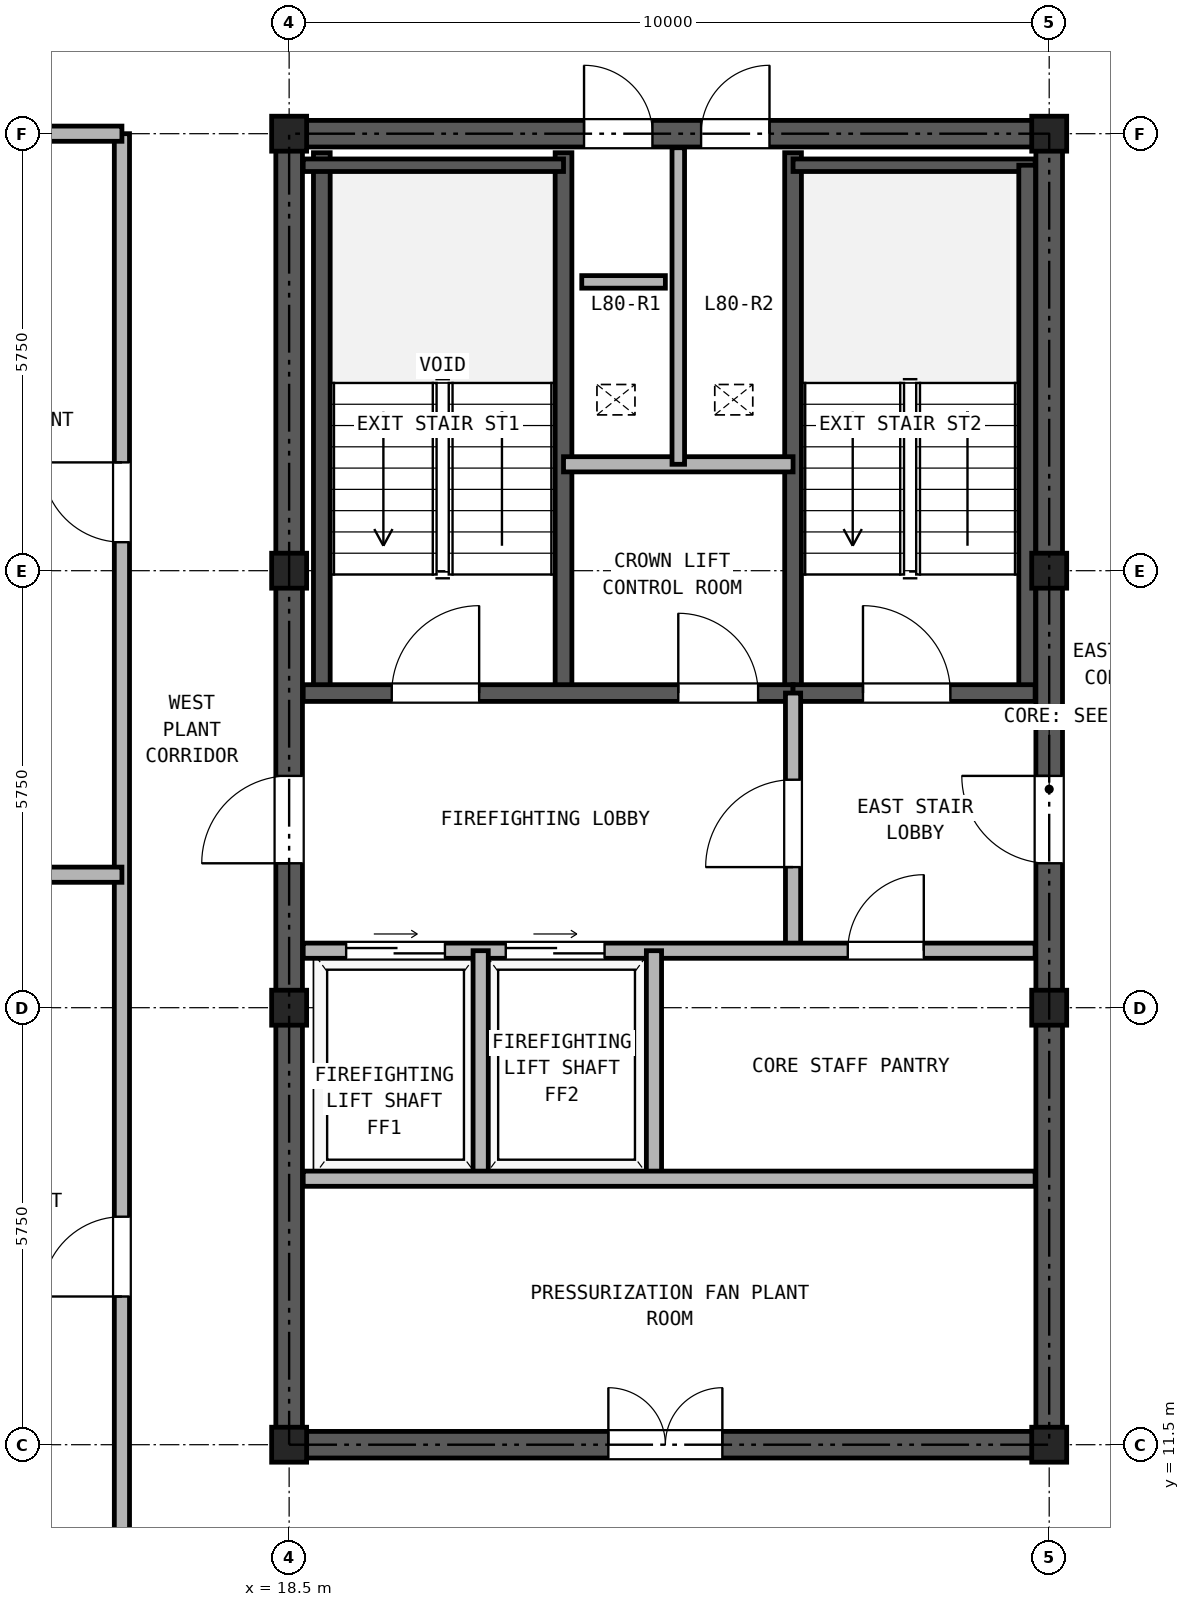
"""IFC4 building model, lengths in metres.
Left out: names, types, materials, properties, quantities, classifications, styles, units other than length and angle.
Written with IfcOpenShell. Run it as: python <this file> out.ifc"""

import sys

from ifc_helpers import new_model, si_unit, direction, frame, frame_2d, origin, origin_2d, place, context, subcontext, project, spatial, rectangle, hollow_rectangle, extrude, source, transform, mapped, element, fill, save


model = new_model("IFC4")
c1 = context("Model", 3, precision=1e-05, world=origin(), true_north=direction((0.0, 1.0)))
c2 = subcontext(c1, "Body", "Model", "MODEL_VIEW")
j1 = project(units=[si_unit("LENGTHUNIT", "METRE"), si_unit("PLANEANGLEUNIT", "RADIAN")], contexts=[c1])
p1 = place(None, origin())
s1 = spatial("IfcSite", under=j1, at=p1, CompositionType="ELEMENT")
p2 = place(p1, origin())
s2 = spatial("IfcBuilding", under=s1, at=p2, CompositionType="ELEMENT")
p3 = place(p2, frame((0.0, 0.0, 278.5)))
s3 = spatial("IfcBuildingStorey", under=s2, at=p3, CompositionType="ELEMENT", Elevation=278.5)
m1 = source(origin(), c2, "Body", "SweptSolid", [
    extrude(hollow_rectangle(XDim=0.46, YDim=0.46, WallThickness=0.025, at=origin_2d()), origin(), (0.0, 0.0, 1.0), 3.38),
])
for number, where, z_axis, x_axis in (
    (1, (18.5, 11.5, 0.0), (0.0, 0.0, 1.0), (1.0, 0.0, 0.0)),
    (2, (18.5, 17.25, 0.0), (0.0, 0.0, 1.0), (1.0, 0.0, 0.0)),
    (3, (18.5, 23.0, 0.0), (0.0, 0.0, 1.0), (1.0, 0.0, 0.0)),
    (4, (18.5, 28.75, 0.0), (0.0, 0.0, 1.0), (1.0, 0.0, 0.0)),
    (5, (28.5, 11.5, 0.0), (0.0, 0.0, 1.0), (1.0, 0.0, 0.0)),
    (6, (28.5, 17.25, 0.0), (0.0, 0.0, 1.0), (1.0, 0.0, 0.0)),
    (7, (28.5, 23.0, 0.0), (0.0, 0.0, 1.0), (1.0, 0.0, 0.0)),
    (8, (28.5, 28.75, 0.0), (0.0, 0.0, 1.0), (1.0, 0.0, 0.0)),
):
    element("IfcColumn", number, at=place(p3, frame(where, z_axis=z_axis, x_axis=x_axis)), inside=s3, PredefinedType="COLUMN", context=c2, shape_type="MappedRepresentation", body=[
        mapped(m1, transform((0.0, 0.0, 0.0), x_axis=(1.0, 0.0, 0.0), y_axis=(0.0, 1.0, 0.0), z_axis=(0.0, 0.0, 1.0), scale=1.0)),
    ])
p4 = place(p3, frame((18.325, 11.5, 0.0), z_axis=(0.0, 0.0, 1.0), x_axis=(1.0, 0.0, 0.0)))
e9 = element("IfcWall", 9, at=p4, inside=s3, PredefinedType="SHEAR", context=c2, shape_type="SweptSolid", body=[
    extrude(rectangle(XDim=10.35, YDim=0.35, at=frame_2d((5.175, 0.0))), origin(), (0.0, 0.0, 1.0), 3.38),
])
p5 = place(p4, frame((4.375, 0.0, 0.0)))
e10 = element("IfcOpeningElement", 10, at=p5, cuts=e9, PredefinedType="OPENING", context=c2, shape_type="SweptSolid", body=[
    extrude(rectangle(XDim=1.5, YDim=2.25, at=frame_2d((0.75, 1.125))), frame((0.0, 0.185, 0.0), z_axis=(0.0, -1.0, 0.0), x_axis=(1.0, 0.0, 0.0)), (0.0, 0.0, 1.0), 0.37),
])
p6 = place(p3, frame((18.325, 28.75, 0.0), z_axis=(0.0, 0.0, 1.0), x_axis=(1.0, 0.0, 0.0)))
e11 = element("IfcWall", 11, at=p6, inside=s3, PredefinedType="SHEAR", context=c2, shape_type="SweptSolid", body=[
    extrude(rectangle(XDim=10.35, YDim=0.35, at=frame_2d((5.175, 0.0))), origin(), (0.0, 0.0, 1.0), 3.38),
])
p7 = place(p6, frame((4.055, 0.0, 0.0)))
e12 = element("IfcOpeningElement", 12, at=p7, cuts=e11, PredefinedType="OPENING", context=c2, shape_type="SweptSolid", body=[
    extrude(rectangle(XDim=0.9, YDim=2.05, at=frame_2d((0.45, 1.025))), frame((0.0, 0.185, 0.0), z_axis=(0.0, -1.0, 0.0), x_axis=(1.0, 0.0, 0.0)), (0.0, 0.0, 1.0), 0.37),
])
p8 = place(p6, frame((5.595, 0.0, 0.0)))
e13 = element("IfcOpeningElement", 13, at=p8, cuts=e11, PredefinedType="OPENING", context=c2, shape_type="SweptSolid", body=[
    extrude(rectangle(XDim=0.9, YDim=2.05, at=frame_2d((0.45, 1.025))), frame((0.0, 0.185, 0.0), z_axis=(0.0, -1.0, 0.0), x_axis=(1.0, 0.0, 0.0)), (0.0, 0.0, 1.0), 0.37),
])
p9 = place(p3, frame((18.5, 11.675, 0.0), z_axis=(0.0, 0.0, 1.0), x_axis=(0.0, 1.0, 0.0)))
e14 = element("IfcWall", 14, at=p9, inside=s3, PredefinedType="SHEAR", context=c2, shape_type="SweptSolid", body=[
    extrude(rectangle(XDim=16.9, YDim=0.35, at=frame_2d((8.45, 0.0))), origin(), (0.0, 0.0, 1.0), 3.38),
])
p10 = place(p9, frame((7.475, 0.0, 0.0)))
e15 = element("IfcOpeningElement", 15, at=p10, cuts=e14, PredefinedType="OPENING", context=c2, shape_type="SweptSolid", body=[
    extrude(rectangle(XDim=1.15, YDim=2.2, at=frame_2d((0.575, 1.1))), frame((0.0, 0.185, 0.0), z_axis=(0.0, -1.0, 0.0), x_axis=(1.0, 0.0, 0.0)), (0.0, 0.0, 1.0), 0.37),
])
p11 = place(p3, frame((28.5, 11.675, 0.0), z_axis=(0.0, 0.0, 1.0), x_axis=(0.0, 1.0, 0.0)))
e16 = element("IfcWall", 16, at=p11, inside=s3, PredefinedType="SHEAR", context=c2, shape_type="SweptSolid", body=[
    extrude(rectangle(XDim=16.9, YDim=0.35, at=frame_2d((8.45, 0.0))), origin(), (0.0, 0.0, 1.0), 3.38),
])
p12 = place(p11, frame((7.475, 0.0, 0.0)))
e17 = element("IfcOpeningElement", 17, at=p12, cuts=e16, PredefinedType="OPENING", context=c2, shape_type="SweptSolid", body=[
    extrude(rectangle(XDim=1.15, YDim=2.2, at=frame_2d((0.575, 1.1))), frame((0.0, 0.185, 0.0), z_axis=(0.0, -1.0, 0.0), x_axis=(1.0, 0.0, 0.0)), (0.0, 0.0, 1.0), 0.37),
])
for number, where, z_axis, x_axis in (
    (18, (18.93, 21.39, 0.0), (0.0, 0.0, 1.0), (0.0, 1.0, 0.0)),
    (19, (22.11, 21.39, 0.0), (0.0, 0.0, 1.0), (0.0, 1.0, 0.0)),
    (20, (25.13, 21.39, 0.0), (0.0, 0.0, 1.0), (0.0, 1.0, 0.0)),
):
    element("IfcWall", number, at=place(p3, frame(where, z_axis=z_axis, x_axis=x_axis)), inside=s3, PredefinedType="SOLIDWALL", context=c2, shape_type="SweptSolid", body=[
        extrude(rectangle(XDim=7.11, YDim=0.22, at=frame_2d((3.555, 0.0))), origin(), (0.0, 0.0, 1.0), 3.38),
    ])
p13 = place(p3, frame((18.685, 28.335, 0.0), z_axis=(0.0, 0.0, 1.0), x_axis=(1.0, 0.0, 0.0)))
e21 = element("IfcWall", 21, at=p13, inside=s3, PredefinedType="PARTITIONING", context=c2, shape_type="SweptSolid", body=[
    extrude(rectangle(XDim=3.425, YDim=0.165, at=frame_2d((1.712, 0.0))), origin(), (0.0, 0.0, 1.0), 3.38),
])
p14 = place(p3, frame((25.13, 28.335, 0.0), z_axis=(0.0, 0.0, 1.0), x_axis=(1.0, 0.0, 0.0)))
e22 = element("IfcWall", 22, at=p14, inside=s3, PredefinedType="PARTITIONING", context=c2, shape_type="SweptSolid", body=[
    extrude(rectangle(XDim=3.185, YDim=0.165, at=frame_2d((1.593, 0.0))), origin(), (0.0, 0.0, 1.0), 3.38),
])
p15 = place(p3, frame((28.21, 21.39, 0.0), z_axis=(0.0, 0.0, 1.0), x_axis=(0.0, 1.0, 0.0)))
e23 = element("IfcWall", 23, at=p15, inside=s3, PredefinedType="SOLIDWALL", context=c2, shape_type="SweptSolid", body=[
    extrude(rectangle(XDim=6.945, YDim=0.22, at=frame_2d((3.473, 0.0))), origin(), (0.0, 0.0, 1.0), 3.38),
])
p16 = place(p3, frame((18.685, 21.39, 0.0), z_axis=(0.0, 0.0, 1.0), x_axis=(1.0, 0.0, 0.0)))
e24 = element("IfcWall", 24, at=p16, inside=s3, PredefinedType="SOLIDWALL", context=c2, shape_type="SweptSolid", body=[
    extrude(rectangle(XDim=6.445, YDim=0.22, at=frame_2d((3.222, 0.0))), origin(), (0.0, 0.0, 1.0), 3.38),
])
p17 = place(p16, frame((1.165, 0.0, 0.0)))
e25 = element("IfcOpeningElement", 25, at=p17, cuts=e24, PredefinedType="OPENING", context=c2, shape_type="SweptSolid", body=[
    extrude(rectangle(XDim=1.15, YDim=2.2, at=frame_2d((0.575, 1.1))), frame((0.0, 0.12, 0.0), z_axis=(0.0, -1.0, 0.0), x_axis=(1.0, 0.0, 0.0)), (0.0, 0.0, 1.0), 0.24),
])
p18 = place(p16, frame((4.935, 0.0, 0.0)))
e26 = element("IfcOpeningElement", 26, at=p18, cuts=e24, PredefinedType="OPENING", context=c2, shape_type="SweptSolid", body=[
    extrude(rectangle(XDim=1.05, YDim=2.15, at=frame_2d((0.525, 1.075))), frame((0.0, 0.12, 0.0), z_axis=(0.0, -1.0, 0.0), x_axis=(1.0, 0.0, 0.0)), (0.0, 0.0, 1.0), 0.24),
])
p19 = place(p3, frame((25.13, 21.39, 0.0), z_axis=(0.0, 0.0, 1.0), x_axis=(1.0, 0.0, 0.0)))
e27 = element("IfcWall", 27, at=p19, inside=s3, PredefinedType="SOLIDWALL", context=c2, shape_type="SweptSolid", body=[
    extrude(rectangle(XDim=3.185, YDim=0.22, at=frame_2d((1.593, 0.0))), origin(), (0.0, 0.0, 1.0), 3.38),
])
p20 = place(p19, frame((0.92, 0.0, 0.0)))
e28 = element("IfcOpeningElement", 28, at=p20, cuts=e27, PredefinedType="OPENING", context=c2, shape_type="SweptSolid", body=[
    extrude(rectangle(XDim=1.15, YDim=2.2, at=frame_2d((0.575, 1.1))), frame((0.0, 0.12, 0.0), z_axis=(0.0, -1.0, 0.0), x_axis=(1.0, 0.0, 0.0)), (0.0, 0.0, 1.0), 0.24),
])
p21 = place(p3, frame((22.11, 24.4, 0.0), z_axis=(0.0, 0.0, 1.0), x_axis=(1.0, 0.0, 0.0)))
e29 = element("IfcWall", 29, at=p21, inside=s3, PredefinedType="PARTITIONING", context=c2, shape_type="SweptSolid", body=[
    extrude(rectangle(XDim=3.02, YDim=0.2, at=frame_2d((1.51, 0.0))), origin(), (0.0, 0.0, 1.0), 3.38),
])
p22 = place(p3, frame((23.62, 24.4, 0.0), z_axis=(0.0, 0.0, 1.0), x_axis=(0.0, 1.0, 0.0)))
e30 = element("IfcWall", 30, at=p22, inside=s3, PredefinedType="PARTITIONING", context=c2, shape_type="SweptSolid", body=[
    extrude(rectangle(XDim=4.165, YDim=0.165, at=frame_2d((2.083, 0.0))), origin(), (0.0, 0.0, 1.0), 3.38),
])
p23 = place(p3, frame((25.13, 18.0, 0.0), z_axis=(0.0, 0.0, 1.0), x_axis=(0.0, 1.0, 0.0)))
e31 = element("IfcWall", 31, at=p23, inside=s3, PredefinedType="PARTITIONING", context=c2, shape_type="SweptSolid", body=[
    extrude(rectangle(XDim=3.39, YDim=0.2, at=frame_2d((1.695, 0.0))), origin(), (0.0, 0.0, 1.0), 3.38),
])
p24 = place(p23, frame((1.1, 0.0, 0.0)))
e32 = element("IfcOpeningElement", 32, at=p24, cuts=e31, PredefinedType="OPENING", context=c2, shape_type="SweptSolid", body=[
    extrude(rectangle(XDim=1.15, YDim=2.2, at=frame_2d((0.575, 1.1))), frame((0.0, 0.11, 0.0), z_axis=(0.0, -1.0, 0.0), x_axis=(1.0, 0.0, 0.0)), (0.0, 0.0, 1.0), 0.22),
])
p25 = place(p3, frame((18.685, 18.0, 0.0), z_axis=(0.0, 0.0, 1.0), x_axis=(1.0, 0.0, 0.0)))
e33 = element("IfcWall", 33, at=p25, inside=s3, PredefinedType="PARTITIONING", context=c2, shape_type="SweptSolid", body=[
    extrude(rectangle(XDim=9.63, YDim=0.2, at=frame_2d((4.815, 0.0))), origin(), (0.0, 0.0, 1.0), 3.38),
])
p26 = place(p25, frame((0.565, 0.0, 0.0)))
e34 = element("IfcOpeningElement", 34, at=p26, cuts=e33, PredefinedType="OPENING", context=c2, shape_type="SweptSolid", body=[
    extrude(rectangle(XDim=1.3, YDim=2.3, at=frame_2d((0.65, 1.15))), frame((0.0, 0.11, 0.0), z_axis=(0.0, -1.0, 0.0), x_axis=(1.0, 0.0, 0.0)), (0.0, 0.0, 1.0), 0.22),
])
p27 = place(p25, frame((2.665, 0.0, 0.0)))
e35 = element("IfcOpeningElement", 35, at=p27, cuts=e33, PredefinedType="OPENING", context=c2, shape_type="SweptSolid", body=[
    extrude(rectangle(XDim=1.3, YDim=2.3, at=frame_2d((0.65, 1.15))), frame((0.0, 0.11, 0.0), z_axis=(0.0, -1.0, 0.0), x_axis=(1.0, 0.0, 0.0)), (0.0, 0.0, 1.0), 0.22),
])
p28 = place(p25, frame((7.165, 0.0, 0.0)))
e36 = element("IfcOpeningElement", 36, at=p28, cuts=e33, PredefinedType="OPENING", context=c2, shape_type="SweptSolid", body=[
    extrude(rectangle(XDim=1.0, YDim=2.15, at=frame_2d((0.5, 1.075))), frame((0.0, 0.11, 0.0), z_axis=(0.0, -1.0, 0.0), x_axis=(1.0, 0.0, 0.0)), (0.0, 0.0, 1.0), 0.22),
])
for number, where, z_axis, x_axis in (
    (37, (21.02, 15.0, 0.0), (0.0, 0.0, 1.0), (0.0, 1.0, 0.0)),
    (38, (23.3, 15.0, 0.0), (0.0, 0.0, 1.0), (0.0, 1.0, 0.0)),
):
    element("IfcWall", number, at=place(p3, frame(where, z_axis=z_axis, x_axis=x_axis)), inside=s3, PredefinedType="PARTITIONING", context=c2, shape_type="SweptSolid", body=[
        extrude(rectangle(XDim=3.0, YDim=0.2, at=frame_2d((1.5, 0.0))), origin(), (0.0, 0.0, 1.0), 3.38),
    ])
p29 = place(p3, frame((18.685, 15.0, 0.0), z_axis=(0.0, 0.0, 1.0), x_axis=(1.0, 0.0, 0.0)))
e39 = element("IfcWall", 39, at=p29, inside=s3, PredefinedType="PARTITIONING", context=c2, shape_type="SweptSolid", body=[
    extrude(rectangle(XDim=9.63, YDim=0.2, at=frame_2d((4.815, 0.0))), origin(), (0.0, 0.0, 1.0), 3.38),
])
p30 = place(p3, frame((16.3, 8.9, 0.0), z_axis=(0.0, 0.0, 1.0), x_axis=(0.0, 1.0, 0.0)))
e40 = element("IfcWall", 40, at=p30, inside=s3, PredefinedType="PARTITIONING", context=c2, shape_type="SweptSolid", body=[
    extrude(rectangle(XDim=19.85, YDim=0.2, at=frame_2d((9.925, 0.0))), origin(), (0.0, 0.0, 1.0), 3.38),
])
p31 = place(p30, frame((4.55, 0.0, 0.0)))
e41 = element("IfcOpeningElement", 41, at=p31, cuts=e40, PredefinedType="OPENING", context=c2, shape_type="SweptSolid", body=[
    extrude(rectangle(XDim=1.05, YDim=2.15, at=frame_2d((0.525, 1.075))), frame((0.0, 0.11, 0.0), z_axis=(0.0, -1.0, 0.0), x_axis=(1.0, 0.0, 0.0)), (0.0, 0.0, 1.0), 0.22),
])
p32 = place(p30, frame((14.475, 0.0, 0.0)))
e42 = element("IfcOpeningElement", 42, at=p32, cuts=e40, PredefinedType="OPENING", context=c2, shape_type="SweptSolid", body=[
    extrude(rectangle(XDim=1.05, YDim=2.15, at=frame_2d((0.525, 1.075))), frame((0.0, 0.11, 0.0), z_axis=(0.0, -1.0, 0.0), x_axis=(1.0, 0.0, 0.0)), (0.0, 0.0, 1.0), 0.22),
])
p33 = place(p3, frame((12.45, 28.75, 0.0), z_axis=(0.0, 0.0, 1.0), x_axis=(1.0, 0.0, 0.0)))
e43 = element("IfcWall", 43, at=p33, inside=s3, PredefinedType="PARTITIONING", context=c2, shape_type="SweptSolid", body=[
    extrude(rectangle(XDim=3.85, YDim=0.2, at=frame_2d((1.925, 0.0))), origin(), (0.0, 0.0, 1.0), 2.905),
])
p34 = place(p3, frame((12.45, 19.0, 0.0), z_axis=(0.0, 0.0, 1.0), x_axis=(1.0, 0.0, 0.0)))
e44 = element("IfcWall", 44, at=p34, inside=s3, PredefinedType="PARTITIONING", context=c2, shape_type="SweptSolid", body=[
    extrude(rectangle(XDim=3.85, YDim=0.2, at=frame_2d((1.925, 0.0))), origin(), (0.0, 0.0, 1.0), 3.38),
])
p35 = place(p3, frame((22.35, 26.8, 0.0), z_axis=(0.0, 0.0, 1.0), x_axis=(1.0, 0.0, 0.0)))
e45 = element("IfcWall", 45, at=p35, inside=s3, PredefinedType="PARTITIONING", context=c2, shape_type="SweptSolid", body=[
    extrude(rectangle(XDim=1.1, YDim=0.165, at=frame_2d((0.55, 0.0))), origin(), (0.0, 0.0, 1.0), 3.38),
])
p36 = place(p17, frame((1.15, 0.0, 0.0), z_axis=(0.0, 0.0, 1.0), x_axis=(-1.0, 0.0, 0.0)))
e46 = element("IfcDoor", 46, at=p36, inside=s3, OperationType="SINGLE_SWING_RIGHT", PredefinedType="DOOR", context=c2, shape_type="SweptSolid", body=[
    extrude(rectangle(XDim=1.15, YDim=2.2, at=frame_2d((0.575, 1.1))), frame((0.0, 0.025, 0.0), z_axis=(0.0, -1.0, 0.0), x_axis=(1.0, 0.0, 0.0)), (0.0, 0.0, 1.0), 0.05),
])
fill(e25, e46)
p37 = place(p20, frame((1.15, 0.0, 0.0), z_axis=(0.0, 0.0, 1.0), x_axis=(-1.0, 0.0, 0.0)))
e47 = element("IfcDoor", 47, at=p37, inside=s3, OperationType="SINGLE_SWING_LEFT", PredefinedType="DOOR", context=c2, shape_type="SweptSolid", body=[
    extrude(rectangle(XDim=1.15, YDim=2.2, at=frame_2d((0.575, 1.1))), frame((0.0, 0.025, 0.0), z_axis=(0.0, -1.0, 0.0), x_axis=(1.0, 0.0, 0.0)), (0.0, 0.0, 1.0), 0.05),
])
fill(e28, e47)
p38 = place(p18, origin())
e48 = element("IfcDoor", 48, at=p38, inside=s3, OperationType="SINGLE_SWING_LEFT", PredefinedType="DOOR", context=c2, shape_type="SweptSolid", body=[
    extrude(rectangle(XDim=1.05, YDim=2.15, at=frame_2d((0.525, 1.075))), frame((0.0, 0.025, 0.0), z_axis=(0.0, -1.0, 0.0), x_axis=(1.0, 0.0, 0.0)), (0.0, 0.0, 1.0), 0.05),
])
fill(e26, e48)
p39 = place(p24, origin())
e49 = element("IfcDoor", 49, at=p39, inside=s3, OperationType="SINGLE_SWING_LEFT", PredefinedType="DOOR", context=c2, shape_type="SweptSolid", body=[
    extrude(rectangle(XDim=1.15, YDim=2.2, at=frame_2d((0.575, 1.1))), frame((0.0, 0.025, 0.0), z_axis=(0.0, -1.0, 0.0), x_axis=(1.0, 0.0, 0.0)), (0.0, 0.0, 1.0), 0.05),
])
fill(e32, e49)
p40 = place(p26, origin())
e50 = element("IfcDoor", 50, at=p40, inside=s3, OperationType="DOUBLE_DOOR_SLIDING", PredefinedType="DOOR", context=c2, shape_type="SweptSolid", body=[
    extrude(rectangle(XDim=1.3, YDim=2.3, at=frame_2d((0.65, 1.15))), frame((0.0, 0.025, 0.0), z_axis=(0.0, -1.0, 0.0), x_axis=(1.0, 0.0, 0.0)), (0.0, 0.0, 1.0), 0.05),
])
fill(e34, e50)
p41 = place(p27, origin())
e51 = element("IfcDoor", 51, at=p41, inside=s3, OperationType="DOUBLE_DOOR_SLIDING", PredefinedType="DOOR", context=c2, shape_type="SweptSolid", body=[
    extrude(rectangle(XDim=1.3, YDim=2.3, at=frame_2d((0.65, 1.15))), frame((0.0, 0.025, 0.0), z_axis=(0.0, -1.0, 0.0), x_axis=(1.0, 0.0, 0.0)), (0.0, 0.0, 1.0), 0.05),
])
fill(e35, e51)
p42 = place(p28, frame((1.0, 0.0, 0.0), z_axis=(0.0, 0.0, 1.0), x_axis=(-1.0, 0.0, 0.0)))
e52 = element("IfcDoor", 52, at=p42, inside=s3, OperationType="SINGLE_SWING_RIGHT", PredefinedType="DOOR", context=c2, shape_type="SweptSolid", body=[
    extrude(rectangle(XDim=1.0, YDim=2.15, at=frame_2d((0.5, 1.075))), frame((0.0, 0.025, 0.0), z_axis=(0.0, -1.0, 0.0), x_axis=(1.0, 0.0, 0.0)), (0.0, 0.0, 1.0), 0.05),
])
fill(e36, e52)
p43 = place(p10, frame((1.15, 0.0, 0.0), z_axis=(0.0, 0.0, 1.0), x_axis=(-1.0, 0.0, 0.0)))
e53 = element("IfcDoor", 53, at=p43, inside=s3, OperationType="SINGLE_SWING_LEFT", PredefinedType="DOOR", context=c2, shape_type="SweptSolid", body=[
    extrude(rectangle(XDim=1.15, YDim=2.2, at=frame_2d((0.575, 1.1))), frame((0.0, 0.025, 0.0), z_axis=(0.0, -1.0, 0.0), x_axis=(1.0, 0.0, 0.0)), (0.0, 0.0, 1.0), 0.05),
])
fill(e15, e53)
p44 = place(p12, origin())
e54 = element("IfcDoor", 54, at=p44, inside=s3, OperationType="SINGLE_SWING_RIGHT", PredefinedType="DOOR", context=c2, shape_type="SweptSolid", body=[
    extrude(rectangle(XDim=1.15, YDim=2.2, at=frame_2d((0.575, 1.1))), frame((0.0, 0.025, 0.0), z_axis=(0.0, -1.0, 0.0), x_axis=(1.0, 0.0, 0.0)), (0.0, 0.0, 1.0), 0.05),
])
fill(e17, e54)
p45 = place(p7, origin())
e55 = element("IfcDoor", 55, at=p45, inside=s3, OperationType="SINGLE_SWING_LEFT", PredefinedType="DOOR", context=c2, shape_type="SweptSolid", body=[
    extrude(rectangle(XDim=0.9, YDim=2.05, at=frame_2d((0.45, 1.025))), frame((0.0, 0.025, 0.0), z_axis=(0.0, -1.0, 0.0), x_axis=(1.0, 0.0, 0.0)), (0.0, 0.0, 1.0), 0.05),
])
fill(e12, e55)
p46 = place(p8, origin())
e56 = element("IfcDoor", 56, at=p46, inside=s3, OperationType="SINGLE_SWING_RIGHT", PredefinedType="DOOR", context=c2, shape_type="SweptSolid", body=[
    extrude(rectangle(XDim=0.9, YDim=2.05, at=frame_2d((0.45, 1.025))), frame((0.0, 0.025, 0.0), z_axis=(0.0, -1.0, 0.0), x_axis=(1.0, 0.0, 0.0)), (0.0, 0.0, 1.0), 0.05),
])
fill(e13, e56)
p47 = place(p5, frame((1.5, 0.0, 0.0), z_axis=(0.0, 0.0, 1.0), x_axis=(-1.0, 0.0, 0.0)))
e57 = element("IfcDoor", 57, at=p47, inside=s3, OperationType="DOUBLE_DOOR_SINGLE_SWING", PredefinedType="DOOR", context=c2, shape_type="SweptSolid", body=[
    extrude(rectangle(XDim=1.5, YDim=2.25, at=frame_2d((0.75, 1.125))), frame((0.0, 0.025, 0.0), z_axis=(0.0, -1.0, 0.0), x_axis=(1.0, 0.0, 0.0)), (0.0, 0.0, 1.0), 0.05),
])
fill(e10, e57)
p48 = place(p31, frame((1.05, 0.0, 0.0), z_axis=(0.0, 0.0, 1.0), x_axis=(-1.0, 0.0, 0.0)))
e58 = element("IfcDoor", 58, at=p48, inside=s3, OperationType="SINGLE_SWING_LEFT", PredefinedType="DOOR", context=c2, shape_type="SweptSolid", body=[
    extrude(rectangle(XDim=1.05, YDim=2.15, at=frame_2d((0.525, 1.075))), frame((0.0, 0.025, 0.0), z_axis=(0.0, -1.0, 0.0), x_axis=(1.0, 0.0, 0.0)), (0.0, 0.0, 1.0), 0.05),
])
fill(e41, e58)
p49 = place(p32, frame((1.05, 0.0, 0.0), z_axis=(0.0, 0.0, 1.0), x_axis=(-1.0, 0.0, 0.0)))
e59 = element("IfcDoor", 59, at=p49, inside=s3, OperationType="SINGLE_SWING_RIGHT", PredefinedType="DOOR", context=c2, shape_type="SweptSolid", body=[
    extrude(rectangle(XDim=1.05, YDim=2.15, at=frame_2d((0.525, 1.075))), frame((0.0, 0.025, 0.0), z_axis=(0.0, -1.0, 0.0), x_axis=(1.0, 0.0, 0.0)), (0.0, 0.0, 1.0), 0.05),
])
fill(e42, e59)
save(model, sys.argv[1])
